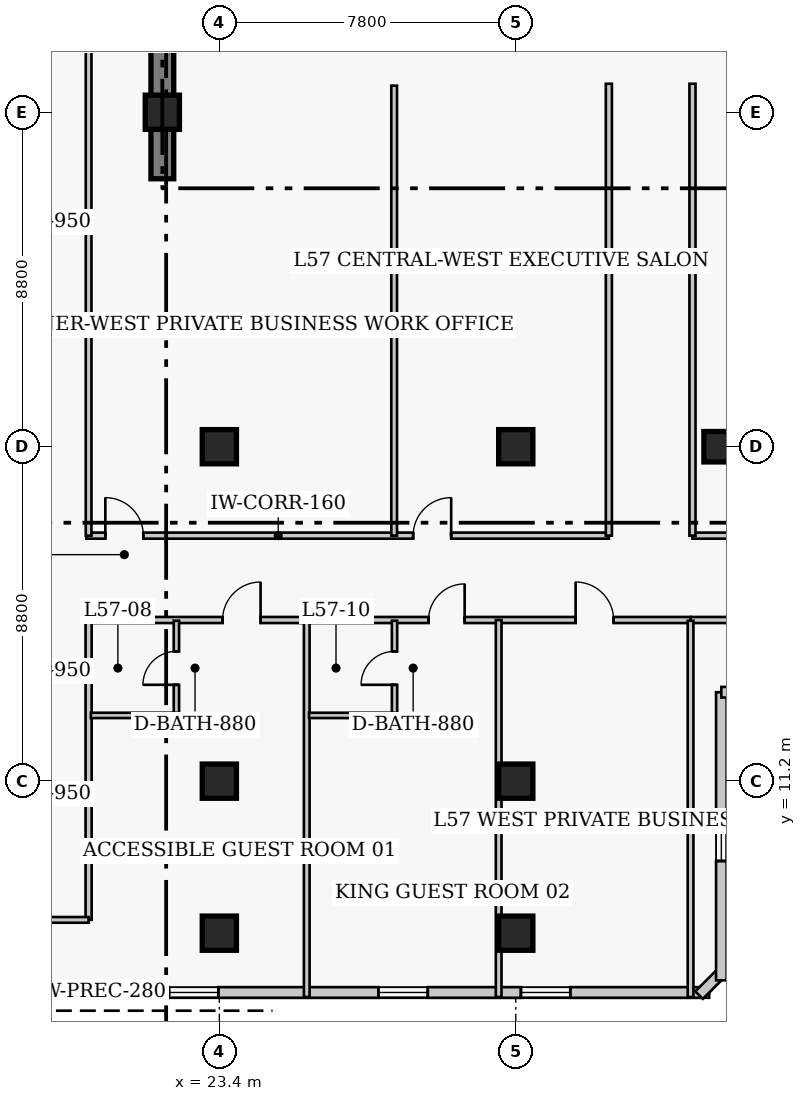
"""IFC4 building model, lengths in metres.
Left out: names, types, materials, properties, quantities, classifications, styles, units other than length and angle.
Written with IfcOpenShell. Run it as: python <this file> out.ifc"""

import sys

from ifc_helpers import new_model, si_unit, direction, frame, frame_2d, origin, origin_2d, place, context, subcontext, project, spatial, rectangle, extrude, element, fill, save


model = new_model("IFC4")
c1 = context("Model", 3, precision=1e-05, world=origin(), true_north=direction((0.0, 1.0)))
c2 = subcontext(c1, "Body", "Model", "MODEL_VIEW")
j1 = project(units=[si_unit("LENGTHUNIT", "METRE"), si_unit("PLANEANGLEUNIT", "RADIAN")], contexts=[c1])
p1 = place(None, origin())
s1 = spatial("IfcSite", under=j1, at=p1, CompositionType="ELEMENT")
p2 = place(p1, origin())
s2 = spatial("IfcBuilding", under=s1, at=p2, CompositionType="ELEMENT")
p3 = place(p2, frame((0.0, 0.0, 228.0)))
s3 = spatial("IfcBuildingStorey", under=s2, at=p3, CompositionType="ELEMENT", Elevation=228.0)
p4 = place(p3, frame((21.9, 27.05, 0.0), z_axis=(0.0, 0.0, 1.0), x_axis=(0.0, 1.0, 0.0)))
e1 = element("IfcWall", 1, at=p4, inside=s3, PredefinedType="SHEAR", context=c2, shape_type="SweptSolid", body=[
    extrude(rectangle(XDim=13.57, YDim=0.6, at=frame_2d((6.785, 0.0))), origin(), (0.0, 0.0, 1.0), 3.9),
])
for number, where, z_axis, x_axis in (
    (2, (23.4, 11.2, 0.0), (0.0, 0.0, 1.0), (1.0, 0.0, 0.0)),
    (3, (23.4, 20.0, 0.0), (0.0, 0.0, 1.0), (1.0, 0.0, 0.0)),
    (4, (31.2, 11.2, 0.0), (0.0, 0.0, 1.0), (1.0, 0.0, 0.0)),
    (5, (31.2, 20.0, 0.0), (0.0, 0.0, 1.0), (1.0, 0.0, 0.0)),
):
    element("IfcColumn", number, at=place(p3, frame(where, z_axis=z_axis, x_axis=x_axis)), inside=s3, PredefinedType="COLUMN", context=c2, shape_type="SweptSolid", body=[
        extrude(rectangle(XDim=0.9, YDim=0.9, at=origin_2d()), origin(), (0.0, 0.0, 1.0), 3.9),
    ])
p5 = place(p3, frame((36.75, 20.0, 0.0), z_axis=(0.0, 0.0, 1.0), x_axis=(1.0, 0.0, 0.0)))
e6 = element("IfcColumn", 6, at=p5, inside=s3, PredefinedType="COLUMN", context=c2, shape_type="SweptSolid", body=[
    extrude(rectangle(XDim=1.2, YDim=0.8, at=origin_2d()), origin(), (0.0, 0.0, 1.0), 3.9),
])
for number, where, z_axis, x_axis in (
    (7, (21.9, 28.8, 0.0), (0.0, 0.0, 1.0), (1.0, 0.0, 0.0)),
    (8, (23.4, 7.2, 0.0), (0.0, 0.0, 1.0), (1.0, 0.0, 0.0)),
    (9, (31.2, 7.2, 0.0), (0.0, 0.0, 1.0), (1.0, 0.0, 0.0)),
):
    element("IfcColumn", number, at=place(p3, frame(where, z_axis=z_axis, x_axis=x_axis)), inside=s3, PredefinedType="COLUMN", context=c2, shape_type="SweptSolid", body=[
        extrude(rectangle(XDim=0.9, YDim=0.9, at=origin_2d()), origin(), (0.0, 0.0, 1.0), 3.9),
    ])
p6 = place(p3, frame((10.46, 5.64, 0.0), z_axis=(0.0, 0.0, 1.0), x_axis=(1.0, 0.0, 0.0)))
e10 = element("IfcWall", 10, at=p6, inside=s3, PredefinedType="SOLIDWALL", context=c2, shape_type="SweptSolid", body=[
    extrude(rectangle(XDim=25.83, YDim=0.28, at=frame_2d((12.915, 0.0))), origin(), (0.0, 0.0, 1.0), 3.56),
])
p7 = place(p6, frame((4.305, 0.0, 0.85)))
e11 = element("IfcOpeningElement", 11, at=p7, cuts=e10, PredefinedType="OPENING", context=c2, shape_type="SweptSolid", body=[
    extrude(rectangle(XDim=1.3, YDim=1.7, at=frame_2d((0.65, 0.85))), frame((0.0, 0.15, 0.0), z_axis=(0.0, -1.0, 0.0), x_axis=(1.0, 0.0, 0.0)), (0.0, 0.0, 1.0), 0.3),
])
p8 = place(p6, frame((11.615, 0.0, 0.85)))
e12 = element("IfcOpeningElement", 12, at=p8, cuts=e10, PredefinedType="OPENING", context=c2, shape_type="SweptSolid", body=[
    extrude(rectangle(XDim=1.3, YDim=1.7, at=frame_2d((0.65, 0.85))), frame((0.0, 0.15, 0.0), z_axis=(0.0, -1.0, 0.0), x_axis=(1.0, 0.0, 0.0)), (0.0, 0.0, 1.0), 0.3),
])
p9 = place(p6, frame((20.875, 0.0, 0.85)))
e13 = element("IfcOpeningElement", 13, at=p9, cuts=e10, PredefinedType="OPENING", context=c2, shape_type="SweptSolid", body=[
    extrude(rectangle(XDim=1.3, YDim=1.7, at=frame_2d((0.65, 0.85))), frame((0.0, 0.15, 0.0), z_axis=(0.0, -1.0, 0.0), x_axis=(1.0, 0.0, 0.0)), (0.0, 0.0, 1.0), 0.3),
])
p10 = place(p6, frame((17.125, 0.0, 0.85)))
e14 = element("IfcOpeningElement", 14, at=p10, cuts=e10, PredefinedType="OPENING", context=c2, shape_type="SweptSolid", body=[
    extrude(rectangle(XDim=1.3, YDim=1.7, at=frame_2d((0.65, 0.85))), frame((0.0, 0.15, 0.0), z_axis=(0.0, -1.0, 0.0), x_axis=(1.0, 0.0, 0.0)), (0.0, 0.0, 1.0), 0.3),
])
p11 = place(p3, frame((36.023, 5.571, 0.0), z_axis=(0.0, 0.0, 1.0), x_axis=(0.707106781187, 0.707106781187, 0.0)))
e15 = element("IfcWall", 15, at=p11, inside=s3, PredefinedType="SOLIDWALL", context=c2, shape_type="SweptSolid", body=[
    extrude(rectangle(XDim=0.928, YDim=0.28, at=frame_2d((0.464, 0.0))), origin(), (0.0, 0.0, 1.0), 3.56),
])
p12 = place(p3, frame((36.61, 5.96, 0.0), z_axis=(0.0, 0.0, 1.0), x_axis=(0.0, 1.0, 0.0)))
e16 = element("IfcWall", 16, at=p12, inside=s3, PredefinedType="SOLIDWALL", context=c2, shape_type="SweptSolid", body=[
    extrude(rectangle(XDim=7.58, YDim=0.28, at=frame_2d((3.79, 0.0))), origin(), (0.0, 0.0, 1.0), 3.56),
])
p13 = place(p12, frame((3.14, 0.0, 0.85)))
e17 = element("IfcOpeningElement", 17, at=p13, cuts=e16, PredefinedType="OPENING", context=c2, shape_type="SweptSolid", body=[
    extrude(rectangle(XDim=1.3, YDim=1.7, at=frame_2d((0.65, 0.85))), frame((0.0, 0.15, 0.0), z_axis=(0.0, -1.0, 0.0), x_axis=(1.0, 0.0, 0.0)), (0.0, 0.0, 1.0), 0.3),
])
p14 = place(p3, frame((36.61, 13.54, 0.0), z_axis=(0.0, 0.0, 1.0), x_axis=(1.0, 0.0, 0.0)))
e18 = element("IfcWall", 18, at=p14, inside=s3, PredefinedType="SOLIDWALL", context=c2, shape_type="SweptSolid", body=[
    extrude(rectangle(XDim=4.78, YDim=0.28, at=frame_2d((2.39, 0.0))), origin(), (0.0, 0.0, 1.0), 3.56),
])
p15 = place(p14, frame((1.74, 0.0, 0.85)))
e19 = element("IfcOpeningElement", 19, at=p15, cuts=e18, PredefinedType="OPENING", context=c2, shape_type="SweptSolid", body=[
    extrude(rectangle(XDim=1.3, YDim=1.7, at=frame_2d((0.65, 0.85))), frame((0.0, 0.15, 0.0), z_axis=(0.0, -1.0, 0.0), x_axis=(1.0, 0.0, 0.0)), (0.0, 0.0, 1.0), 0.3),
])
p16 = place(p3, frame((19.9, 17.66, 0.0), z_axis=(0.0, 0.0, 1.0), x_axis=(1.0, 0.0, 0.0)))
e20 = element("IfcWall", 20, at=p16, inside=s3, PredefinedType="PARTITIONING", context=c2, shape_type="SweptSolid", body=[
    extrude(rectangle(XDim=13.75, YDim=0.16, at=frame_2d((6.875, 0.0))), origin(), (0.0, 0.0, 1.0), 3.56),
])
p17 = place(p16, frame((0.5, 0.0, 0.0)))
e21 = element("IfcOpeningElement", 21, at=p17, cuts=e20, PredefinedType="OPENING", context=c2, shape_type="SweptSolid", body=[
    extrude(rectangle(XDim=1.0, YDim=2.15, at=frame_2d((0.5, 1.075))), frame((0.0, 0.09, 0.0), z_axis=(0.0, -1.0, 0.0), x_axis=(1.0, 0.0, 0.0)), (0.0, 0.0, 1.0), 0.18),
])
p18 = place(p16, frame((8.6, 0.0, 0.0)))
e22 = element("IfcOpeningElement", 22, at=p18, cuts=e20, PredefinedType="OPENING", context=c2, shape_type="SweptSolid", body=[
    extrude(rectangle(XDim=1.0, YDim=2.15, at=frame_2d((0.5, 1.075))), frame((0.0, 0.09, 0.0), z_axis=(0.0, -1.0, 0.0), x_axis=(1.0, 0.0, 0.0)), (0.0, 0.0, 1.0), 0.18),
])
p19 = place(p3, frame((35.85, 17.66, 0.0), z_axis=(0.0, 0.0, 1.0), x_axis=(1.0, 0.0, 0.0)))
e23 = element("IfcWall", 23, at=p19, inside=s3, PredefinedType="PARTITIONING", context=c2, shape_type="SweptSolid", body=[
    extrude(rectangle(XDim=23.45, YDim=0.16, at=frame_2d((11.725, 0.0))), origin(), (0.0, 0.0, 1.0), 3.56),
])
p20 = place(p19, frame((6.45, 0.0, 0.0)))
e24 = element("IfcOpeningElement", 24, at=p20, cuts=e23, PredefinedType="OPENING", context=c2, shape_type="SweptSolid", body=[
    extrude(rectangle(XDim=1.0, YDim=2.15, at=frame_2d((0.5, 1.075))), frame((0.0, 0.09, 0.0), z_axis=(0.0, -1.0, 0.0), x_axis=(1.0, 0.0, 0.0)), (0.0, 0.0, 1.0), 0.18),
])
p21 = place(p19, frame((19.075, 0.0, 0.0)))
e25 = element("IfcOpeningElement", 25, at=p21, cuts=e23, PredefinedType="OPENING", context=c2, shape_type="SweptSolid", body=[
    extrude(rectangle(XDim=1.0, YDim=2.15, at=frame_2d((0.5, 1.075))), frame((0.0, 0.09, 0.0), z_axis=(0.0, -1.0, 0.0), x_axis=(1.0, 0.0, 0.0)), (0.0, 0.0, 1.0), 0.18),
])
for number, where, z_axis, x_axis in (
    (26, (33.65, 17.66, 0.0), (0.0, 0.0, 1.0), (0.0, 1.0, 0.0)),
    (27, (35.85, 17.66, 0.0), (0.0, 0.0, 1.0), (0.0, 1.0, 0.0)),
):
    element("IfcWall", number, at=place(p3, frame(where, z_axis=z_axis, x_axis=x_axis)), inside=s3, PredefinedType="PARTITIONING", context=c2, shape_type="SweptSolid", body=[
        extrude(rectangle(XDim=11.89, YDim=0.16, at=frame_2d((5.945, 0.0))), origin(), (0.0, 0.0, 1.0), 3.56),
    ])
p22 = place(p3, frame((19.9, 15.44, 0.0), z_axis=(0.0, 0.0, 1.0), x_axis=(1.0, 0.0, 0.0)))
e28 = element("IfcWall", 28, at=p22, inside=s3, PredefinedType="PARTITIONING", context=c2, shape_type="SweptSolid", body=[
    extrude(rectangle(XDim=15.9, YDim=0.16, at=frame_2d((7.95, 0.0))), origin(), (0.0, 0.0, 1.0), 3.56),
])
p23 = place(p22, frame((3.585, 0.0, 0.0)))
e29 = element("IfcOpeningElement", 29, at=p23, cuts=e28, PredefinedType="OPENING", context=c2, shape_type="SweptSolid", body=[
    extrude(rectangle(XDim=1.0, YDim=2.15, at=frame_2d((0.5, 1.075))), frame((0.0, 0.09, 0.0), z_axis=(0.0, -1.0, 0.0), x_axis=(1.0, 0.0, 0.0)), (0.0, 0.0, 1.0), 0.18),
])
p24 = place(p22, frame((9.005, 0.0, 0.0)))
e30 = element("IfcOpeningElement", 30, at=p24, cuts=e28, PredefinedType="OPENING", context=c2, shape_type="SweptSolid", body=[
    extrude(rectangle(XDim=0.95, YDim=2.1, at=frame_2d((0.475, 1.05))), frame((0.0, 0.09, 0.0), z_axis=(0.0, -1.0, 0.0), x_axis=(1.0, 0.0, 0.0)), (0.0, 0.0, 1.0), 0.18),
])
p25 = place(p22, frame((12.875, 0.0, 0.0)))
e31 = element("IfcOpeningElement", 31, at=p25, cuts=e28, PredefinedType="OPENING", context=c2, shape_type="SweptSolid", body=[
    extrude(rectangle(XDim=1.0, YDim=2.15, at=frame_2d((0.5, 1.075))), frame((0.0, 0.09, 0.0), z_axis=(0.0, -1.0, 0.0), x_axis=(1.0, 0.0, 0.0)), (0.0, 0.0, 1.0), 0.18),
])
p26 = place(p3, frame((35.8, 15.44, 0.0), z_axis=(0.0, 0.0, 1.0), x_axis=(1.0, 0.0, 0.0)))
e32 = element("IfcWall", 32, at=p26, inside=s3, PredefinedType="PARTITIONING", context=c2, shape_type="SweptSolid", body=[
    extrude(rectangle(XDim=23.5, YDim=0.16, at=frame_2d((11.75, 0.0))), origin(), (0.0, 0.0, 1.0), 3.56),
])
p27 = place(p26, frame((10.57, 0.0, 0.0)))
e33 = element("IfcOpeningElement", 33, at=p27, cuts=e32, PredefinedType="OPENING", context=c2, shape_type="SweptSolid", body=[
    extrude(rectangle(XDim=0.95, YDim=2.1, at=frame_2d((0.475, 1.05))), frame((0.0, 0.09, 0.0), z_axis=(0.0, -1.0, 0.0), x_axis=(1.0, 0.0, 0.0)), (0.0, 0.0, 1.0), 0.18),
])
p28 = place(p26, frame((15.105, 0.0, 0.0)))
e34 = element("IfcOpeningElement", 34, at=p28, cuts=e32, PredefinedType="OPENING", context=c2, shape_type="SweptSolid", body=[
    extrude(rectangle(XDim=1.0, YDim=2.15, at=frame_2d((0.5, 1.075))), frame((0.0, 0.09, 0.0), z_axis=(0.0, -1.0, 0.0), x_axis=(1.0, 0.0, 0.0)), (0.0, 0.0, 1.0), 0.18),
])
p29 = place(p26, frame((19.285, 0.0, 0.0)))
e35 = element("IfcOpeningElement", 35, at=p29, cuts=e32, PredefinedType="OPENING", context=c2, shape_type="SweptSolid", body=[
    extrude(rectangle(XDim=0.95, YDim=2.1, at=frame_2d((0.475, 1.05))), frame((0.0, 0.09, 0.0), z_axis=(0.0, -1.0, 0.0), x_axis=(1.0, 0.0, 0.0)), (0.0, 0.0, 1.0), 0.18),
])
p30 = place(p3, frame((19.96, 7.55, 0.0), z_axis=(0.0, 0.0, 1.0), x_axis=(0.0, 1.0, 0.0)))
e36 = element("IfcWall", 36, at=p30, inside=s3, PredefinedType="PARTITIONING", context=c2, shape_type="SweptSolid", body=[
    extrude(rectangle(XDim=7.89, YDim=0.16, at=frame_2d((3.945, 0.0))), origin(), (0.0, 0.0, 1.0), 3.56),
])
p31 = place(p3, frame((17.74, 7.55, 0.0), z_axis=(0.0, 0.0, 1.0), x_axis=(1.0, 0.0, 0.0)))
e37 = element("IfcWall", 37, at=p31, inside=s3, PredefinedType="PARTITIONING", context=c2, shape_type="SweptSolid", body=[
    extrude(rectangle(XDim=2.22, YDim=0.15, at=frame_2d((1.11, 0.0))), origin(), (0.0, 0.0, 1.0), 3.56),
])
p32 = place(p3, frame((19.96, 17.66, 0.0), z_axis=(0.0, 0.0, 1.0), x_axis=(0.0, 1.0, 0.0)))
e38 = element("IfcWall", 38, at=p32, inside=s3, PredefinedType="PARTITIONING", context=c2, shape_type="SweptSolid", body=[
    extrude(rectangle(XDim=15.14, YDim=0.15, at=frame_2d((7.57, 0.0))), origin(), (0.0, 0.0, 1.0), 3.56),
])
p33 = place(p3, frame((28.0, 17.66, 0.0), z_axis=(0.0, 0.0, 1.0), x_axis=(0.0, 1.0, 0.0)))
e39 = element("IfcWall", 39, at=p33, inside=s3, PredefinedType="PARTITIONING", context=c2, shape_type="SweptSolid", body=[
    extrude(rectangle(XDim=11.84, YDim=0.15, at=frame_2d((5.92, 0.0))), origin(), (0.0, 0.0, 1.0), 3.56),
])
p34 = place(p3, frame((22.27, 12.93, 0.0), z_axis=(0.0, 0.0, 1.0), x_axis=(0.0, 1.0, 0.0)))
e40 = element("IfcWall", 40, at=p34, inside=s3, PredefinedType="PLUMBINGWALL", context=c2, shape_type="SweptSolid", body=[
    extrude(rectangle(XDim=2.49, YDim=0.14, at=frame_2d((1.245, 0.0))), origin(), (0.0, 0.0, 1.0), 3.56),
])
p35 = place(p34, frame((0.805, 0.0, 0.0)))
e41 = element("IfcOpeningElement", 41, at=p35, cuts=e40, PredefinedType="OPENING", context=c2, shape_type="SweptSolid", body=[
    extrude(rectangle(XDim=0.88, YDim=2.05, at=frame_2d((0.44, 1.025))), frame((0.0, 0.08, 0.0), z_axis=(0.0, -1.0, 0.0), x_axis=(1.0, 0.0, 0.0)), (0.0, 0.0, 1.0), 0.16),
])
p36 = place(p3, frame((20.02, 12.93, 0.0), z_axis=(0.0, 0.0, 1.0), x_axis=(1.0, 0.0, 0.0)))
e42 = element("IfcWall", 42, at=p36, inside=s3, PredefinedType="PLUMBINGWALL", context=c2, shape_type="SweptSolid", body=[
    extrude(rectangle(XDim=2.25, YDim=0.14, at=frame_2d((1.125, 0.0))), origin(), (0.0, 0.0, 1.0), 3.56),
])
p37 = place(p3, frame((25.7, 5.52, 0.0), z_axis=(0.0, 0.0, 1.0), x_axis=(0.0, 1.0, 0.0)))
e43 = element("IfcWall", 43, at=p37, inside=s3, PredefinedType="PARTITIONING", context=c2, shape_type="SweptSolid", body=[
    extrude(rectangle(XDim=9.92, YDim=0.15, at=frame_2d((4.96, 0.0))), origin(), (0.0, 0.0, 1.0), 3.56),
])
p38 = place(p3, frame((28.01, 12.93, 0.0), z_axis=(0.0, 0.0, 1.0), x_axis=(0.0, 1.0, 0.0)))
e44 = element("IfcWall", 44, at=p38, inside=s3, PredefinedType="PLUMBINGWALL", context=c2, shape_type="SweptSolid", body=[
    extrude(rectangle(XDim=2.49, YDim=0.14, at=frame_2d((1.245, 0.0))), origin(), (0.0, 0.0, 1.0), 3.56),
])
p39 = place(p38, frame((0.805, 0.0, 0.0)))
e45 = element("IfcOpeningElement", 45, at=p39, cuts=e44, PredefinedType="OPENING", context=c2, shape_type="SweptSolid", body=[
    extrude(rectangle(XDim=0.88, YDim=2.05, at=frame_2d((0.44, 1.025))), frame((0.0, 0.08, 0.0), z_axis=(0.0, -1.0, 0.0), x_axis=(1.0, 0.0, 0.0)), (0.0, 0.0, 1.0), 0.16),
])
p40 = place(p3, frame((25.76, 12.93, 0.0), z_axis=(0.0, 0.0, 1.0), x_axis=(1.0, 0.0, 0.0)))
e46 = element("IfcWall", 46, at=p40, inside=s3, PredefinedType="PLUMBINGWALL", context=c2, shape_type="SweptSolid", body=[
    extrude(rectangle(XDim=2.25, YDim=0.14, at=frame_2d((1.125, 0.0))), origin(), (0.0, 0.0, 1.0), 3.56),
])
p41 = place(p3, frame((30.75, 5.52, 0.0), z_axis=(0.0, 0.0, 1.0), x_axis=(0.0, 1.0, 0.0)))
e47 = element("IfcWall", 47, at=p41, inside=s3, PredefinedType="PARTITIONING", context=c2, shape_type="SweptSolid", body=[
    extrude(rectangle(XDim=9.92, YDim=0.15, at=frame_2d((4.96, 0.0))), origin(), (0.0, 0.0, 1.0), 3.56),
])
p42 = place(p3, frame((35.8, 5.52, 0.0), z_axis=(0.0, 0.0, 1.0), x_axis=(0.0, 1.0, 0.0)))
e48 = element("IfcWall", 48, at=p42, inside=s3, PredefinedType="PARTITIONING", context=c2, shape_type="SweptSolid", body=[
    extrude(rectangle(XDim=9.9, YDim=0.15, at=frame_2d((4.95, 0.0))), origin(), (0.0, 0.0, 1.0), 3.56),
])
p43 = place(p8, origin())
e49 = element("IfcWindow", 49, at=p43, inside=s3, PartitioningType="SINGLE_PANEL", PredefinedType="WINDOW", context=c2, shape_type="SweptSolid", body=[
    extrude(rectangle(XDim=1.3, YDim=1.7, at=frame_2d((0.65, 0.85))), frame((0.0, 0.03, 0.0), z_axis=(0.0, -1.0, 0.0), x_axis=(1.0, 0.0, 0.0)), (0.0, 0.0, 1.0), 0.06),
])
fill(e12, e49)
p44 = place(p9, origin())
e50 = element("IfcWindow", 50, at=p44, inside=s3, PartitioningType="SINGLE_PANEL", PredefinedType="WINDOW", context=c2, shape_type="SweptSolid", body=[
    extrude(rectangle(XDim=1.3, YDim=1.7, at=frame_2d((0.65, 0.85))), frame((0.0, 0.03, 0.0), z_axis=(0.0, -1.0, 0.0), x_axis=(1.0, 0.0, 0.0)), (0.0, 0.0, 1.0), 0.06),
])
fill(e13, e50)
p45 = place(p13, origin())
e51 = element("IfcWindow", 51, at=p45, inside=s3, PartitioningType="SINGLE_PANEL", PredefinedType="WINDOW", context=c2, shape_type="SweptSolid", body=[
    extrude(rectangle(XDim=1.3, YDim=1.7, at=frame_2d((0.65, 0.85))), frame((0.0, 0.03, 0.0), z_axis=(0.0, -1.0, 0.0), x_axis=(1.0, 0.0, 0.0)), (0.0, 0.0, 1.0), 0.06),
])
fill(e17, e51)
p46 = place(p10, origin())
e52 = element("IfcWindow", 52, at=p46, inside=s3, PartitioningType="SINGLE_PANEL", PredefinedType="WINDOW", context=c2, shape_type="SweptSolid", body=[
    extrude(rectangle(XDim=1.3, YDim=1.7, at=frame_2d((0.65, 0.85))), frame((0.0, 0.03, 0.0), z_axis=(0.0, -1.0, 0.0), x_axis=(1.0, 0.0, 0.0)), (0.0, 0.0, 1.0), 0.06),
])
fill(e14, e52)
p47 = place(p17, origin())
e53 = element("IfcDoor", 53, at=p47, inside=s3, OperationType="SINGLE_SWING_LEFT", PredefinedType="DOOR", context=c2, shape_type="SweptSolid", body=[
    extrude(rectangle(XDim=1.0, YDim=2.15, at=frame_2d((0.5, 1.075))), frame((0.0, 0.025, 0.0), z_axis=(0.0, -1.0, 0.0), x_axis=(1.0, 0.0, 0.0)), (0.0, 0.0, 1.0), 0.05),
])
fill(e21, e53)
p48 = place(p18, origin())
e54 = element("IfcDoor", 54, at=p48, inside=s3, OperationType="SINGLE_SWING_RIGHT", PredefinedType="DOOR", context=c2, shape_type="SweptSolid", body=[
    extrude(rectangle(XDim=1.0, YDim=2.15, at=frame_2d((0.5, 1.075))), frame((0.0, 0.025, 0.0), z_axis=(0.0, -1.0, 0.0), x_axis=(1.0, 0.0, 0.0)), (0.0, 0.0, 1.0), 0.05),
])
fill(e22, e54)
p49 = place(p35, origin())
e55 = element("IfcDoor", 55, at=p49, inside=s3, OperationType="SINGLE_SWING_LEFT", PredefinedType="DOOR", context=c2, shape_type="SweptSolid", body=[
    extrude(rectangle(XDim=0.88, YDim=2.05, at=frame_2d((0.44, 1.025))), frame((0.0, 0.025, 0.0), z_axis=(0.0, -1.0, 0.0), x_axis=(1.0, 0.0, 0.0)), (0.0, 0.0, 1.0), 0.05),
])
fill(e41, e55)
p50 = place(p23, origin())
e56 = element("IfcDoor", 56, at=p50, inside=s3, OperationType="SINGLE_SWING_RIGHT", PredefinedType="DOOR", context=c2, shape_type="SweptSolid", body=[
    extrude(rectangle(XDim=1.0, YDim=2.15, at=frame_2d((0.5, 1.075))), frame((0.0, 0.025, 0.0), z_axis=(0.0, -1.0, 0.0), x_axis=(1.0, 0.0, 0.0)), (0.0, 0.0, 1.0), 0.05),
])
fill(e29, e56)
p51 = place(p39, origin())
e57 = element("IfcDoor", 57, at=p51, inside=s3, OperationType="SINGLE_SWING_LEFT", PredefinedType="DOOR", context=c2, shape_type="SweptSolid", body=[
    extrude(rectangle(XDim=0.88, YDim=2.05, at=frame_2d((0.44, 1.025))), frame((0.0, 0.025, 0.0), z_axis=(0.0, -1.0, 0.0), x_axis=(1.0, 0.0, 0.0)), (0.0, 0.0, 1.0), 0.05),
])
fill(e45, e57)
p52 = place(p24, origin())
e58 = element("IfcDoor", 58, at=p52, inside=s3, OperationType="SINGLE_SWING_RIGHT", PredefinedType="DOOR", context=c2, shape_type="SweptSolid", body=[
    extrude(rectangle(XDim=0.95, YDim=2.1, at=frame_2d((0.475, 1.05))), frame((0.0, 0.025, 0.0), z_axis=(0.0, -1.0, 0.0), x_axis=(1.0, 0.0, 0.0)), (0.0, 0.0, 1.0), 0.05),
])
fill(e30, e58)
p53 = place(p25, origin())
e59 = element("IfcDoor", 59, at=p53, inside=s3, OperationType="SINGLE_SWING_LEFT", PredefinedType="DOOR", context=c2, shape_type="SweptSolid", body=[
    extrude(rectangle(XDim=1.0, YDim=2.15, at=frame_2d((0.5, 1.075))), frame((0.0, 0.025, 0.0), z_axis=(0.0, -1.0, 0.0), x_axis=(1.0, 0.0, 0.0)), (0.0, 0.0, 1.0), 0.05),
])
fill(e31, e59)
save(model, sys.argv[1])
